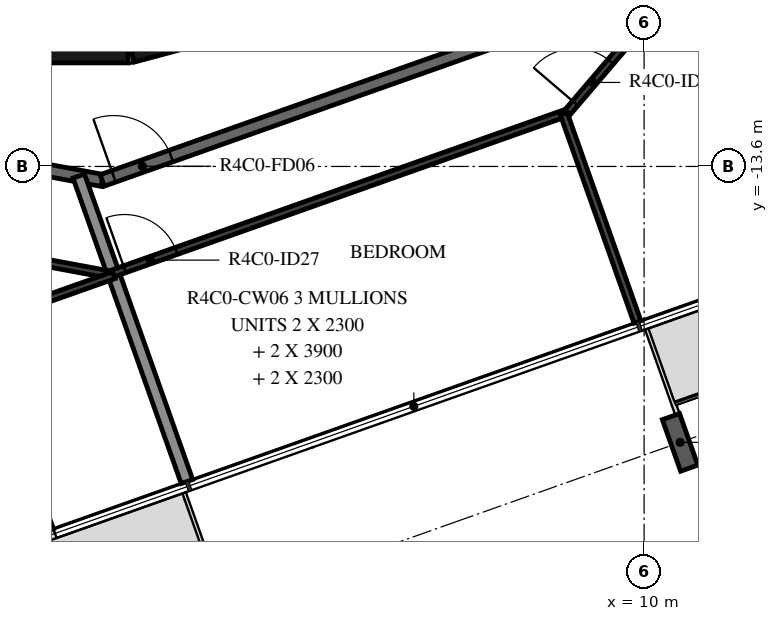
"""IFC4 building model, lengths in metres.
Left out: names, types, materials, properties, quantities, classifications, styles, units other than length and angle.
Written with IfcOpenShell. Run it as: python <this file> out.ifc"""

import sys

from ifc_helpers import new_model, si_unit, direction, frame, frame_2d, origin, origin_2d, place, context, subcontext, project, spatial, rectangle, i_section, extrude, element, fill, save


model = new_model("IFC4")
c1 = context("Model", 3, precision=1e-05, world=origin(), true_north=direction((0.0, 1.0)))
c2 = subcontext(c1, "Body", "Model", "MODEL_VIEW")
j1 = project(units=[si_unit("LENGTHUNIT", "METRE"), si_unit("PLANEANGLEUNIT", "RADIAN")], contexts=[c1])
p1 = place(None, origin())
s1 = spatial("IfcSite", under=j1, at=p1, CompositionType="ELEMENT")
p2 = place(p1, origin())
s2 = spatial("IfcBuilding", under=s1, at=p2, CompositionType="ELEMENT")
p3 = place(p2, frame((0.0, 0.0, 172.7)))
s3 = spatial("IfcBuildingStorey", under=s2, at=p3, CompositionType="ELEMENT", Elevation=172.7)
p4 = place(p3, frame((10.592, -18.138, -0.38), z_axis=(0.0, 0.0, 1.0), x_axis=(-0.942641392079, -0.333807138839, 0.0)))
e1 = element("IfcColumn", 1, at=p4, inside=s3, PredefinedType="COLUMN", context=c2, shape_type="SweptSolid", body=[
    extrude(i_section(OverallWidth=0.3, OverallDepth=0.9, WebThickness=0.019, FlangeThickness=0.035, FilletRadius=0.03, at=origin_2d()), origin(), (0.0, 0.0, 1.0), 3.5),
])
p5 = place(p3, frame((-2.758, -20.552, 0.0), z_axis=(0.0, 0.0, 1.0), x_axis=(0.94265323131, 0.333773704029, 0.0)))
e2 = element("IfcWall", 2, at=p5, inside=s3, PredefinedType="STANDARD", context=c2, shape_type="SweptSolid", body=[
    extrude(rectangle(XDim=3.2, YDim=0.16, at=frame_2d((1.6, 0.0))), origin(), (0.0, 0.0, 1.0), 3.12),
])
p6 = place(p5, frame((0.4, 0.0, 0.0)))
e3 = element("IfcOpeningElement", 3, at=p6, cuts=e2, PredefinedType="OPENING", context=c2, shape_type="SweptSolid", body=[
    extrude(rectangle(XDim=2.4, YDim=2.4, at=frame_2d((1.2, 1.2))), frame((0.0, 0.09, 0.0), z_axis=(0.0, -1.0, 0.0), x_axis=(1.0, 0.0, 0.0)), (0.0, 0.0, 1.0), 0.18),
])
p7 = place(p3, frame((1.55, -11.643, 0.0), z_axis=(0.0, 0.0, 1.0), x_axis=(0.965948410781, 0.258734743916, 0.0)))
e4 = element("IfcWall", 4, at=p7, inside=s3, PredefinedType="SHEAR", context=c2, shape_type="SweptSolid", body=[
    extrude(rectangle(XDim=3.033, YDim=0.5, at=frame_2d((1.516, 0.0))), origin(), (0.0, 0.0, 1.0), 3.12),
])
p8 = place(p3, frame((-1.516, -11.647, 0.0), z_axis=(0.0, 0.0, 1.0), x_axis=(1.0, 0.0, 0.0)))
e5 = element("IfcWall", 5, at=p8, inside=s3, PredefinedType="SHEAR", context=c2, shape_type="SweptSolid", body=[
    extrude(rectangle(XDim=3.033, YDim=0.5, at=frame_2d((1.516, 0.0))), origin(), (0.0, 0.0, 1.0), 3.12),
])
p9 = place(p8, frame((0.016, 0.0, 0.0)))
e6 = element("IfcOpeningElement", 6, at=p9, cuts=e5, PredefinedType="OPENING", context=c2, shape_type="SweptSolid", body=[
    extrude(rectangle(XDim=1.2, YDim=2.1, at=frame_2d((0.6, 1.05))), frame((0.0, 0.26, 0.0), z_axis=(0.0, -1.0, 0.0), x_axis=(1.0, 0.0, 0.0)), (0.0, 0.0, 1.0), 0.52),
])
p10 = place(p3, frame((-5.972, -12.521, 0.0), z_axis=(0.0, 0.0, 1.0), x_axis=(0.983256068163, -0.18222926335, 0.0)))
e7 = element("IfcWall", 7, at=p10, inside=s3, PredefinedType="STANDARD", context=c2, shape_type="SweptSolid", body=[
    extrude(rectangle(XDim=7.181, YDim=0.2, at=frame_2d((3.59, 0.0))), origin(), (0.0, 0.0, 1.0), 3.12),
])
p11 = place(p10, frame((4.7, 0.0, 0.0)))
e8 = element("IfcOpeningElement", 8, at=p11, cuts=e7, PredefinedType="OPENING", context=c2, shape_type="SweptSolid", body=[
    extrude(rectangle(XDim=1.0, YDim=2.1, at=frame_2d((0.5, 1.05))), frame((0.0, 0.11, 0.0), z_axis=(0.0, -1.0, 0.0), x_axis=(1.0, 0.0, 0.0)), (0.0, 0.0, 1.0), 0.22),
])
p12 = place(p3, frame((1.088, -13.83, 0.0), z_axis=(0.0, 0.0, 1.0), x_axis=(0.942648397945, 0.333787354241, 0.0)))
e9 = element("IfcWall", 9, at=p12, inside=s3, PredefinedType="STANDARD", context=c2, shape_type="SweptSolid", body=[
    extrude(rectangle(XDim=7.181, YDim=0.2, at=frame_2d((3.591, 0.0))), origin(), (0.0, 0.0, 1.0), 3.12),
])
p13 = place(p12, frame((0.2, 0.0, 0.0)))
e10 = element("IfcOpeningElement", 10, at=p13, cuts=e9, PredefinedType="OPENING", context=c2, shape_type="SweptSolid", body=[
    extrude(rectangle(XDim=1.0, YDim=2.1, at=frame_2d((0.5, 1.05))), frame((0.0, 0.11, 0.0), z_axis=(0.0, -1.0, 0.0), x_axis=(1.0, 0.0, 0.0)), (0.0, 0.0, 1.0), 0.22),
])
p14 = place(p3, frame((2.482, -18.782, 0.0), z_axis=(0.0, 0.0, 1.0), x_axis=(-0.333807281402, 0.942641341594, 0.0)))
e11 = element("IfcWall", 11, at=p14, inside=s3, PredefinedType="STANDARD", context=c2, shape_type="SweptSolid", body=[
    extrude(rectangle(XDim=5.329, YDim=0.2, at=frame_2d((2.665, 0.0))), origin(), (0.0, 0.0, 1.0), 2.73),
])
p15 = place(p3, frame((-6.641, -13.923, 0.0), z_axis=(0.0, 0.0, 1.0), x_axis=(0.983250157272, -0.182261153912, 0.0)))
e12 = element("IfcWall", 12, at=p15, inside=s3, PredefinedType="PARTITIONING", context=c2, shape_type="SweptSolid", body=[
    extrude(rectangle(XDim=7.985, YDim=0.12, at=frame_2d((3.992, 0.0))), origin(), (0.0, 0.0, 1.0), 3.12),
])
p16 = place(p15, frame((1.612, 0.0, 0.0)))
e13 = element("IfcOpeningElement", 13, at=p16, cuts=e12, PredefinedType="OPENING", context=c2, shape_type="SweptSolid", body=[
    extrude(rectangle(XDim=0.8, YDim=2.1, at=frame_2d((0.4, 1.05))), frame((0.0, 0.07, 0.0), z_axis=(0.0, -1.0, 0.0), x_axis=(1.0, 0.0, 0.0)), (0.0, 0.0, 1.0), 0.14),
])
p17 = place(p3, frame((-12.015, -20.096, 0.0), z_axis=(0.0, 0.0, 1.0), x_axis=(0.942638913957, 0.33381413675, 0.0)))
e14 = element("IfcWall", 14, at=p17, inside=s3, PredefinedType="PARTITIONING", context=c2, shape_type="SweptSolid", body=[
    extrude(rectangle(XDim=14.104, YDim=0.12, at=frame_2d((7.052, 0.0))), origin(), (0.0, 0.0, 1.0), 3.12),
])
p18 = place(p17, frame((2.814, 0.0, 0.0)))
e15 = element("IfcOpeningElement", 15, at=p18, cuts=e14, PredefinedType="OPENING", context=c2, shape_type="SweptSolid", body=[
    extrude(rectangle(XDim=0.9, YDim=2.1, at=frame_2d((0.45, 1.05))), frame((0.0, 0.07, 0.0), z_axis=(0.0, -1.0, 0.0), x_axis=(1.0, 0.0, 0.0)), (0.0, 0.0, 1.0), 0.14),
])
p19 = place(p17, frame((6.444, 0.0, 0.0)))
e16 = element("IfcOpeningElement", 16, at=p19, cuts=e14, PredefinedType="OPENING", context=c2, shape_type="SweptSolid", body=[
    extrude(rectangle(XDim=0.9, YDim=2.1, at=frame_2d((0.45, 1.05))), frame((0.0, 0.07, 0.0), z_axis=(0.0, -1.0, 0.0), x_axis=(1.0, 0.0, 0.0)), (0.0, 0.0, 1.0), 0.14),
])
p20 = place(p17, frame((0.2, 0.0, 0.0)))
e17 = element("IfcOpeningElement", 17, at=p20, cuts=e14, PredefinedType="OPENING", context=c2, shape_type="SweptSolid", body=[
    extrude(rectangle(XDim=0.9, YDim=2.1, at=frame_2d((0.45, 1.05))), frame((0.0, 0.07, 0.0), z_axis=(0.0, -1.0, 0.0), x_axis=(1.0, 0.0, 0.0)), (0.0, 0.0, 1.0), 0.14),
])
p21 = place(p3, frame((1.269, -15.357, 0.0), z_axis=(0.0, 0.0, 1.0), x_axis=(0.942639442898, 0.333812643101, 0.0)))
e18 = element("IfcWall", 18, at=p21, inside=s3, PredefinedType="PARTITIONING", context=c2, shape_type="SweptSolid", body=[
    extrude(rectangle(XDim=7.86, YDim=0.12, at=frame_2d((3.93, 0.0))), origin(), (0.0, 0.0, 1.0), 3.12),
])
p22 = place(p21, frame((0.2, 0.0, 0.0)))
e19 = element("IfcOpeningElement", 19, at=p22, cuts=e18, PredefinedType="OPENING", context=c2, shape_type="SweptSolid", body=[
    extrude(rectangle(XDim=0.9, YDim=2.1, at=frame_2d((0.45, 1.05))), frame((0.0, 0.07, 0.0), z_axis=(0.0, -1.0, 0.0), x_axis=(1.0, 0.0, 0.0)), (0.0, 0.0, 1.0), 0.14),
])
p23 = place(p3, frame((8.737, -12.713, 0.0), z_axis=(0.0, 0.0, 1.0), x_axis=(0.649427973074, 0.760423111031, 0.0)))
e20 = element("IfcWall", 20, at=p23, inside=s3, PredefinedType="PARTITIONING", context=c2, shape_type="SweptSolid", body=[
    extrude(rectangle(XDim=7.571, YDim=0.12, at=frame_2d((3.785, 0.0))), origin(), (0.0, 0.0, 1.0), 3.12),
])
p24 = place(p23, frame((0.2, 0.0, 0.0)))
e21 = element("IfcOpeningElement", 21, at=p24, cuts=e20, PredefinedType="OPENING", context=c2, shape_type="SweptSolid", body=[
    extrude(rectangle(XDim=0.9, YDim=2.1, at=frame_2d((0.45, 1.05))), frame((0.0, 0.07, 0.0), z_axis=(0.0, -1.0, 0.0), x_axis=(1.0, 0.0, 0.0)), (0.0, 0.0, 1.0), 0.14),
])
p25 = place(p23, frame((4.634, 0.0, 0.0)))
e22 = element("IfcOpeningElement", 22, at=p25, cuts=e20, PredefinedType="OPENING", context=c2, shape_type="SweptSolid", body=[
    extrude(rectangle(XDim=0.8, YDim=2.1, at=frame_2d((0.4, 1.05))), frame((0.0, 0.07, 0.0), z_axis=(0.0, -1.0, 0.0), x_axis=(1.0, 0.0, 0.0)), (0.0, 0.0, 1.0), 0.14),
])
p26 = place(p3, frame((9.891, -16.158, 0.0), z_axis=(0.0, 0.0, 1.0), x_axis=(-0.33385336213, 0.942625022262, 0.0)))
e23 = element("IfcWall", 23, at=p26, inside=s3, PredefinedType="PARTITIONING", context=c2, shape_type="SweptSolid", body=[
    extrude(rectangle(XDim=3.633, YDim=0.12, at=frame_2d((1.816, 0.0))), origin(), (0.0, 0.0, 1.0), 2.73),
])
p27 = place(p13, origin())
e24 = element("IfcDoor", 24, at=p27, inside=s3, OperationType="SINGLE_SWING_LEFT", PredefinedType="DOOR", context=c2, shape_type="SweptSolid", body=[
    extrude(rectangle(XDim=1.0, YDim=2.1, at=frame_2d((0.5, 1.05))), frame((0.0, 0.025, 0.0), z_axis=(0.0, -1.0, 0.0), x_axis=(1.0, 0.0, 0.0)), (0.0, 0.0, 1.0), 0.05),
])
fill(e10, e24)
p28 = place(p22, origin())
e25 = element("IfcDoor", 25, at=p28, inside=s3, OperationType="SINGLE_SWING_LEFT", PredefinedType="DOOR", context=c2, shape_type="SweptSolid", body=[
    extrude(rectangle(XDim=0.9, YDim=2.1, at=frame_2d((0.45, 1.05))), frame((0.0, 0.025, 0.0), z_axis=(0.0, -1.0, 0.0), x_axis=(1.0, 0.0, 0.0)), (0.0, 0.0, 1.0), 0.05),
])
fill(e19, e25)
p29 = place(p24, origin())
e26 = element("IfcDoor", 26, at=p29, inside=s3, OperationType="SINGLE_SWING_RIGHT", PredefinedType="DOOR", context=c2, shape_type="SweptSolid", body=[
    extrude(rectangle(XDim=0.9, YDim=2.1, at=frame_2d((0.45, 1.05))), frame((0.0, 0.025, 0.0), z_axis=(0.0, -1.0, 0.0), x_axis=(1.0, 0.0, 0.0)), (0.0, 0.0, 1.0), 0.05),
])
fill(e21, e26)
save(model, sys.argv[1])
